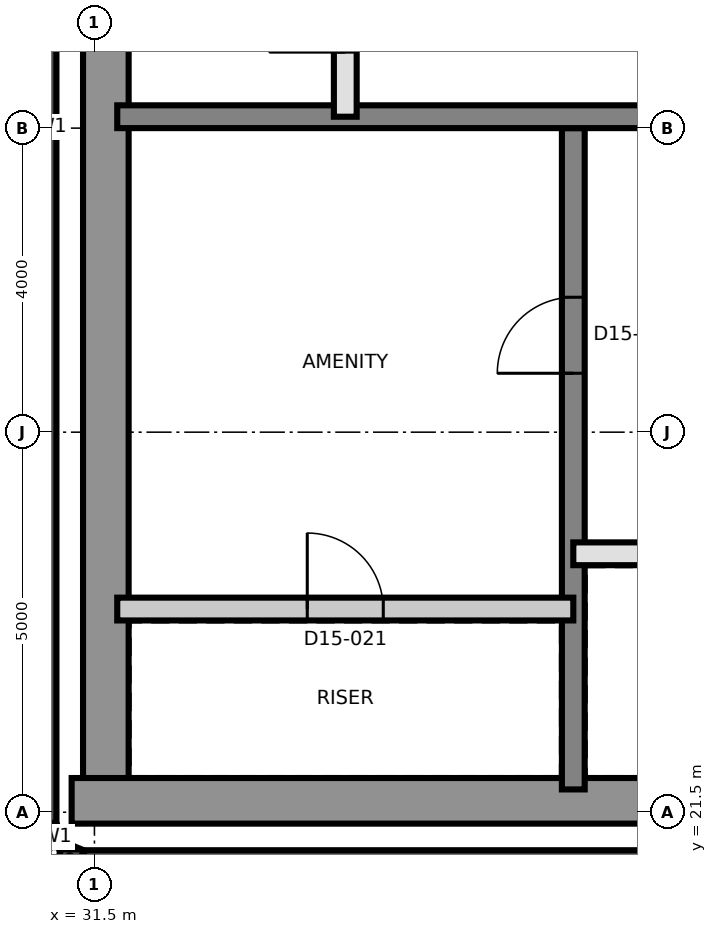
"""IFC4 building model, lengths in metres.
Left out: names, types, materials, properties, quantities, classifications, styles, units other than length and angle.
Written with IfcOpenShell. Run it as: python <this file> out.ifc"""

import sys

from ifc_helpers import new_model, si_unit, direction, frame, frame_2d, origin, place, context, subcontext, project, spatial, rectangle, extrude, element, fill, save


model = new_model("IFC4")
c1 = context("Model", 3, precision=1e-05, world=origin(), true_north=direction((0.0, 1.0)))
c2 = subcontext(c1, "Body", "Model", "MODEL_VIEW")
j1 = project(units=[si_unit("LENGTHUNIT", "METRE"), si_unit("PLANEANGLEUNIT", "RADIAN")], contexts=[c1])
p1 = place(None, origin())
s1 = spatial("IfcSite", under=j1, at=p1, CompositionType="ELEMENT")
p2 = place(p1, origin())
s2 = spatial("IfcBuilding", under=s1, at=p2, CompositionType="ELEMENT")
p3 = place(p2, frame((0.0, 0.0, 157.0)))
s3 = spatial("IfcBuildingStorey", under=s2, at=p3, CompositionType="ELEMENT", Elevation=157.0)
p4 = place(p3, frame((31.65, 21.8, 0.0), z_axis=(0.0, 0.0, 1.0), x_axis=(0.0, 1.0, 0.0)))
e1 = element("IfcWall", 1, at=p4, inside=s3, PredefinedType="SHEAR", context=c2, shape_type="SweptSolid", body=[
    extrude(rectangle(XDim=17.4, YDim=0.6, at=frame_2d((8.7, 0.0))), origin(), (0.0, 0.0, 1.0), 3.7),
])
p5 = place(p3, frame((31.2, 21.65, 0.0), z_axis=(0.0, 0.0, 1.0), x_axis=(1.0, 0.0, 0.0)))
e2 = element("IfcWall", 2, at=p5, inside=s3, PredefinedType="SHEAR", context=c2, shape_type="SweptSolid", body=[
    extrude(rectangle(XDim=27.0, YDim=0.6, at=frame_2d((13.5, 0.0))), origin(), (0.0, 0.0, 1.0), 3.7),
])
p6 = place(p3, frame((37.8, 21.8, 0.0), z_axis=(0.0, 0.0, 1.0), x_axis=(0.0, 1.0, 0.0)))
e3 = element("IfcWall", 3, at=p6, inside=s3, PredefinedType="SHEAR", context=c2, shape_type="SweptSolid", body=[
    extrude(rectangle(XDim=8.7, YDim=0.3, at=frame_2d((4.35, 0.0))), origin(), (0.0, 0.0, 1.0), 3.7),
])
p7 = place(p6, frame((5.475, 0.0, 0.0)))
e4 = element("IfcOpeningElement", 4, at=p7, cuts=e3, PredefinedType="OPENING", context=c2, shape_type="SweptSolid", body=[
    extrude(rectangle(XDim=1.0, YDim=2.1, at=frame_2d((0.5, 1.05))), frame((0.0, 0.16, 0.0), z_axis=(0.0, -1.0, 0.0), x_axis=(1.0, 0.0, 0.0)), (0.0, 0.0, 1.0), 0.32),
])
p8 = place(p3, frame((31.8, 30.65, 0.0), z_axis=(0.0, 0.0, 1.0), x_axis=(1.0, 0.0, 0.0)))
e5 = element("IfcWall", 5, at=p8, inside=s3, PredefinedType="SHEAR", context=c2, shape_type="SweptSolid", body=[
    extrude(rectangle(XDim=26.4, YDim=0.3, at=frame_2d((13.2, 0.0))), origin(), (0.0, 0.0, 1.0), 3.7),
])
p9 = place(p8, frame((24.7, 0.0, 0.0)))
e6 = element("IfcOpeningElement", 6, at=p9, cuts=e5, PredefinedType="OPENING", context=c2, shape_type="SweptSolid", body=[
    extrude(rectangle(XDim=1.0, YDim=2.1, at=frame_2d((0.5, 1.05))), frame((0.0, 0.16, 0.0), z_axis=(0.0, -1.0, 0.0), x_axis=(1.0, 0.0, 0.0)), (0.0, 0.0, 1.0), 0.32),
])
p10 = place(p3, frame((30.85, 39.674, 0.0), z_axis=(0.0, 0.0, 1.0), x_axis=(0.0, -1.0, 0.0)))
e7 = element("IfcWall", 7, at=p10, inside=s3, PredefinedType="SOLIDWALL", context=c2, shape_type="SweptSolid", body=[
    extrude(rectangle(XDim=18.314, YDim=0.3, at=frame_2d((9.157, 0.0))), origin(), (0.0, 0.0, 1.0), 3.4),
])
for number, where, z_axis, x_axis in (
    (8, (30.861, 21.302, 0.0), (0.0, 0.0, 1.0), (0.383, -0.924, 0.0)),
    (9, (31.048, 20.967, 0.0), (0.0, 0.0, 1.0), (0.924, -0.383, 0.0)),
):
    element("IfcWall", number, at=place(p3, frame(where, z_axis=z_axis, x_axis=x_axis)), inside=s3, PredefinedType="SOLIDWALL", context=c2, shape_type="SweptSolid", body=[
        extrude(rectangle(XDim=0.275, YDim=0.3, at=frame_2d((0.138, 0.0))), origin(), (0.0, 0.0, 1.0), 3.4),
    ])
p11 = place(p3, frame((31.36, 20.85, 0.0), z_axis=(0.0, 0.0, 1.0), x_axis=(1.0, 0.0, 0.0)))
e10 = element("IfcWall", 10, at=p11, inside=s3, PredefinedType="SOLIDWALL", context=c2, shape_type="SweptSolid", body=[
    extrude(rectangle(XDim=27.281, YDim=0.3, at=frame_2d((13.64, 0.0))), origin(), (0.0, 0.0, 1.0), 3.4),
])
p12 = place(p3, frame((31.8, 24.173, 0.0), z_axis=(0.0, 0.0, 1.0), x_axis=(1.0, 0.0, 0.0)))
e11 = element("IfcWall", 11, at=p12, inside=s3, PredefinedType="PARTITIONING", context=c2, shape_type="SweptSolid", body=[
    extrude(rectangle(XDim=6.0, YDim=0.3, at=frame_2d((3.0, 0.0))), origin(), (0.0, 0.0, 1.0), 3.4),
])
p13 = place(p12, frame((2.5, 0.0, 0.0)))
e12 = element("IfcOpeningElement", 12, at=p13, cuts=e11, PredefinedType="OPENING", context=c2, shape_type="SweptSolid", body=[
    extrude(rectangle(XDim=1.0, YDim=2.1, at=frame_2d((0.5, 1.05))), frame((0.0, 0.16, 0.0), z_axis=(0.0, -1.0, 0.0), x_axis=(1.0, 0.0, 0.0)), (0.0, 0.0, 1.0), 0.32),
])
p14 = place(p3, frame((37.8, 24.9, 0.0), z_axis=(0.0, 0.0, 1.0), x_axis=(1.0, 0.0, 0.0)))
e13 = element("IfcWall", 13, at=p14, inside=s3, PredefinedType="SOLIDWALL", context=c2, shape_type="SweptSolid", body=[
    extrude(rectangle(XDim=12.0, YDim=0.3, at=frame_2d((6.0, 0.0))), origin(), (0.0, 0.0, 1.0), 3.4),
])
p15 = place(p14, frame((1.05, 0.0, 0.0)))
e14 = element("IfcOpeningElement", 14, at=p15, cuts=e13, PredefinedType="OPENING", context=c2, shape_type="SweptSolid", body=[
    extrude(rectangle(XDim=0.9, YDim=2.1, at=frame_2d((0.45, 1.05))), frame((0.0, 0.16, 0.0), z_axis=(0.0, -1.0, 0.0), x_axis=(1.0, 0.0, 0.0)), (0.0, 0.0, 1.0), 0.32),
])
p16 = place(p14, frame((10.05, 0.0, 0.0)))
e15 = element("IfcOpeningElement", 15, at=p16, cuts=e13, PredefinedType="OPENING", context=c2, shape_type="SweptSolid", body=[
    extrude(rectangle(XDim=0.9, YDim=2.1, at=frame_2d((0.45, 1.05))), frame((0.0, 0.16, 0.0), z_axis=(0.0, -1.0, 0.0), x_axis=(1.0, 0.0, 0.0)), (0.0, 0.0, 1.0), 0.32),
])
p17 = place(p14, frame((3.95, 0.0, 0.0)))
e16 = element("IfcOpeningElement", 16, at=p17, cuts=e13, PredefinedType="OPENING", context=c2, shape_type="SweptSolid", body=[
    extrude(rectangle(XDim=1.1, YDim=2.4, at=frame_2d((0.55, 1.2))), frame((0.0, 0.16, 0.0), z_axis=(0.0, -1.0, 0.0), x_axis=(1.0, 0.0, 0.0)), (0.0, 0.0, 1.0), 0.32),
])
p18 = place(p14, frame((6.95, 0.0, 0.0)))
e17 = element("IfcOpeningElement", 17, at=p18, cuts=e13, PredefinedType="OPENING", context=c2, shape_type="SweptSolid", body=[
    extrude(rectangle(XDim=1.1, YDim=2.4, at=frame_2d((0.55, 1.2))), frame((0.0, 0.16, 0.0), z_axis=(0.0, -1.0, 0.0), x_axis=(1.0, 0.0, 0.0)), (0.0, 0.0, 1.0), 0.32),
])
p19 = place(p3, frame((34.8, 30.65, 0.0), z_axis=(0.0, 0.0, 1.0), x_axis=(0.0, 1.0, 0.0)))
e18 = element("IfcWall", 18, at=p19, inside=s3, PredefinedType="SOLIDWALL", context=c2, shape_type="SweptSolid", body=[
    extrude(rectangle(XDim=2.7, YDim=0.3, at=frame_2d((1.35, 0.0))), origin(), (0.0, 0.0, 1.0), 3.4),
])
p20 = place(p19, frame((0.85, 0.0, 0.0)))
e19 = element("IfcOpeningElement", 19, at=p20, cuts=e18, PredefinedType="OPENING", context=c2, shape_type="SweptSolid", body=[
    extrude(rectangle(XDim=1.0, YDim=2.1, at=frame_2d((0.5, 1.05))), frame((0.0, 0.16, 0.0), z_axis=(0.0, -1.0, 0.0), x_axis=(1.0, 0.0, 0.0)), (0.0, 0.0, 1.0), 0.32),
])
p21 = place(p7, origin())
e20 = element("IfcDoor", 20, at=p21, inside=s3, OperationType="SINGLE_SWING_LEFT", PredefinedType="DOOR", context=c2, shape_type="SweptSolid", body=[
    extrude(rectangle(XDim=1.0, YDim=2.1, at=frame_2d((0.5, 1.05))), frame((0.0, 0.025, 0.0), z_axis=(0.0, -1.0, 0.0), x_axis=(1.0, 0.0, 0.0)), (0.0, 0.0, 1.0), 0.05),
])
fill(e4, e20)
p22 = place(p13, origin())
e21 = element("IfcDoor", 21, at=p22, inside=s3, OperationType="SINGLE_SWING_RIGHT", PredefinedType="DOOR", context=c2, shape_type="SweptSolid", body=[
    extrude(rectangle(XDim=1.0, YDim=2.1, at=frame_2d((0.5, 1.05))), frame((0.0, 0.025, 0.0), z_axis=(0.0, -1.0, 0.0), x_axis=(1.0, 0.0, 0.0)), (0.0, 0.0, 1.0), 0.05),
])
fill(e12, e21)
save(model, sys.argv[1])
